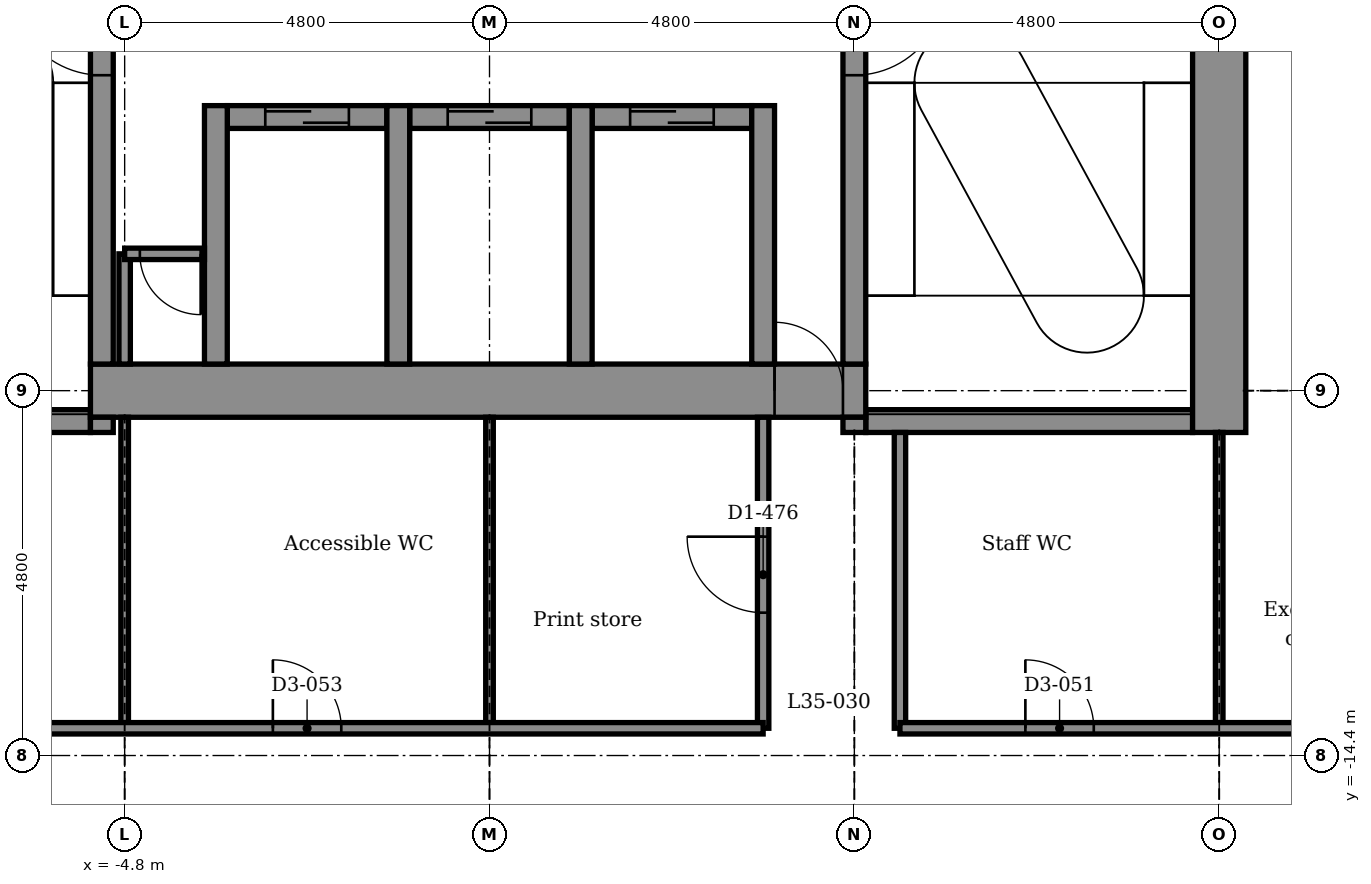
"""IFC4 building model, lengths in metres.
Left out: names, types, materials, properties, quantities, classifications, styles, units other than length and angle.
Written with IfcOpenShell. Run it as: python <this file> out.ifc"""

import sys

from ifc_helpers import new_model, si_unit, direction, frame, frame_2d, origin, place, context, subcontext, project, spatial, rectangle, extrude, element, fill, save


model = new_model("IFC4")
c1 = context("Model", 3, precision=1e-05, world=origin(), true_north=direction((0.0, 1.0)))
c2 = subcontext(c1, "Body", "Model", "MODEL_VIEW")
j1 = project(units=[si_unit("LENGTHUNIT", "METRE"), si_unit("PLANEANGLEUNIT", "RADIAN")], contexts=[c1])
p1 = place(None, origin())
s1 = spatial("IfcSite", under=j1, at=p1, CompositionType="ELEMENT")
p2 = place(p1, origin())
s2 = spatial("IfcBuilding", under=s1, at=p2, CompositionType="ELEMENT")
p3 = place(p2, frame((0.0, 0.0, 170.0)))
s3 = spatial("IfcBuildingStorey", under=s2, at=p3, CompositionType="ELEMENT", Elevation=170.0)
p4 = place(p3, frame((-9.25, -10.0, -0.15), z_axis=(0.0, 0.0, 1.0), x_axis=(1.0, 0.0, 0.0)))
e1 = element("IfcWall", 1, at=p4, inside=s3, PredefinedType="STANDARD", context=c2, shape_type="SweptSolid", body=[
    extrude(rectangle(XDim=4.0, YDim=0.3, at=frame_2d((2.0, 0.0))), origin(), (0.0, 0.0, 1.0), 3.9),
])
p5 = place(p3, frame((4.95, -10.0, -0.15), z_axis=(0.0, 0.0, 1.0), x_axis=(1.0, 0.0, 0.0)))
e2 = element("IfcWall", 2, at=p5, inside=s3, PredefinedType="STANDARD", context=c2, shape_type="SweptSolid", body=[
    extrude(rectangle(XDim=4.3, YDim=0.3, at=frame_2d((2.15, 0.0))), origin(), (0.0, 0.0, 1.0), 3.9),
])
p6 = place(p3, frame((-5.25, -9.6, -0.15), z_axis=(0.0, 0.0, 1.0), x_axis=(1.0, 0.0, 0.0)))
e3 = element("IfcWall", 3, at=p6, inside=s3, PredefinedType="SHEAR", context=c2, shape_type="SweptSolid", body=[
    extrude(rectangle(XDim=10.2, YDim=0.7, at=frame_2d((5.1, 0.0))), origin(), (0.0, 0.0, 1.0), 3.9),
])
p7 = place(p6, frame((9.0, 0.0, 0.15)))
e4 = element("IfcOpeningElement", 4, at=p7, cuts=e3, PredefinedType="OPENING", context=c2, shape_type="SweptSolid", body=[
    extrude(rectangle(XDim=0.9, YDim=2.1, at=frame_2d((0.45, 1.05))), frame((0.0, 0.36, 0.0), z_axis=(0.0, -1.0, 0.0), x_axis=(1.0, 0.0, 0.0)), (0.0, 0.0, 1.0), 0.72),
])
p8 = place(p3, frame((-3.45, -6.0, -0.15), z_axis=(0.0, 0.0, 1.0), x_axis=(1.0, 0.0, 0.0)))
e5 = element("IfcWall", 5, at=p8, inside=s3, PredefinedType="STANDARD", context=c2, shape_type="SweptSolid", body=[
    extrude(rectangle(XDim=2.1, YDim=0.3, at=frame_2d((1.05, 0.0))), origin(), (0.0, 0.0, 1.0), 3.9),
])
p9 = place(p8, frame((0.5, 0.0, 0.15)))
e6 = element("IfcOpeningElement", 6, at=p9, cuts=e5, PredefinedType="OPENING", context=c2, shape_type="SweptSolid", body=[
    extrude(rectangle(XDim=1.1, YDim=2.1, at=frame_2d((0.55, 1.05))), frame((0.0, 0.16, 0.0), z_axis=(0.0, -1.0, 0.0), x_axis=(1.0, 0.0, 0.0)), (0.0, 0.0, 1.0), 0.32),
])
p10 = place(p3, frame((-1.05, -6.0, -0.15), z_axis=(0.0, 0.0, 1.0), x_axis=(1.0, 0.0, 0.0)))
e7 = element("IfcWall", 7, at=p10, inside=s3, PredefinedType="STANDARD", context=c2, shape_type="SweptSolid", body=[
    extrude(rectangle(XDim=2.1, YDim=0.3, at=frame_2d((1.05, 0.0))), origin(), (0.0, 0.0, 1.0), 3.9),
])
p11 = place(p10, frame((0.5, 0.0, 0.15)))
e8 = element("IfcOpeningElement", 8, at=p11, cuts=e7, PredefinedType="OPENING", context=c2, shape_type="SweptSolid", body=[
    extrude(rectangle(XDim=1.1, YDim=2.1, at=frame_2d((0.55, 1.05))), frame((0.0, 0.16, 0.0), z_axis=(0.0, -1.0, 0.0), x_axis=(1.0, 0.0, 0.0)), (0.0, 0.0, 1.0), 0.32),
])
p12 = place(p3, frame((1.35, -6.0, -0.15), z_axis=(0.0, 0.0, 1.0), x_axis=(1.0, 0.0, 0.0)))
e9 = element("IfcWall", 9, at=p12, inside=s3, PredefinedType="STANDARD", context=c2, shape_type="SweptSolid", body=[
    extrude(rectangle(XDim=2.1, YDim=0.3, at=frame_2d((1.05, 0.0))), origin(), (0.0, 0.0, 1.0), 3.9),
])
p13 = place(p12, frame((0.5, 0.0, 0.15)))
e10 = element("IfcOpeningElement", 10, at=p13, cuts=e9, PredefinedType="OPENING", context=c2, shape_type="SweptSolid", body=[
    extrude(rectangle(XDim=1.1, YDim=2.1, at=frame_2d((0.55, 1.05))), frame((0.0, 0.16, 0.0), z_axis=(0.0, -1.0, 0.0), x_axis=(1.0, 0.0, 0.0)), (0.0, 0.0, 1.0), 0.32),
])
p14 = place(p3, frame((-5.1, -10.15, -0.15), z_axis=(0.0, 0.0, 1.0), x_axis=(0.0, 1.0, 0.0)))
e11 = element("IfcWall", 11, at=p14, inside=s3, PredefinedType="STANDARD", context=c2, shape_type="SweptSolid", body=[
    extrude(rectangle(XDim=0.2, YDim=0.3, at=frame_2d((0.1, 0.0))), origin(), (0.0, 0.0, 1.0), 3.9),
])
p15 = place(p3, frame((-5.1, -9.25, -0.15), z_axis=(0.0, 0.0, 1.0), x_axis=(0.0, 1.0, 0.0)))
e12 = element("IfcWall", 12, at=p15, inside=s3, PredefinedType="STANDARD", context=c2, shape_type="SweptSolid", body=[
    extrude(rectangle(XDim=7.0, YDim=0.3, at=frame_2d((3.5, 0.0))), origin(), (0.0, 0.0, 1.0), 3.9),
])
p16 = place(p15, frame((3.8, 0.0, 0.15)))
e13 = element("IfcOpeningElement", 13, at=p16, cuts=e12, PredefinedType="OPENING", context=c2, shape_type="SweptSolid", body=[
    extrude(rectangle(XDim=1.2, YDim=2.1, at=frame_2d((0.6, 1.05))), frame((0.0, 0.16, 0.0), z_axis=(0.0, -1.0, 0.0), x_axis=(1.0, 0.0, 0.0)), (0.0, 0.0, 1.0), 0.32),
])
for number, where, z_axis, x_axis in (
    (14, (-3.6, -9.25, -0.15), (0.0, 0.0, 1.0), (0.0, 1.0, 0.0)),
    (15, (-1.2, -9.25, -0.15), (0.0, 0.0, 1.0), (0.0, 1.0, 0.0)),
    (16, (1.2, -9.25, -0.15), (0.0, 0.0, 1.0), (0.0, 1.0, 0.0)),
    (17, (3.6, -9.25, -0.15), (0.0, 0.0, 1.0), (0.0, 1.0, 0.0)),
):
    element("IfcWall", number, at=place(p3, frame(where, z_axis=z_axis, x_axis=x_axis)), inside=s3, PredefinedType="STANDARD", context=c2, shape_type="SweptSolid", body=[
        extrude(rectangle(XDim=3.4, YDim=0.3, at=frame_2d((1.7, 0.0))), origin(), (0.0, 0.0, 1.0), 3.9),
    ])
p17 = place(p3, frame((4.8, -10.15, -0.15), z_axis=(0.0, 0.0, 1.0), x_axis=(0.0, 1.0, 0.0)))
e18 = element("IfcWall", 18, at=p17, inside=s3, PredefinedType="STANDARD", context=c2, shape_type="SweptSolid", body=[
    extrude(rectangle(XDim=0.2, YDim=0.3, at=frame_2d((0.1, 0.0))), origin(), (0.0, 0.0, 1.0), 3.9),
])
p18 = place(p3, frame((4.8, -9.25, -0.15), z_axis=(0.0, 0.0, 1.0), x_axis=(0.0, 1.0, 0.0)))
e19 = element("IfcWall", 19, at=p18, inside=s3, PredefinedType="STANDARD", context=c2, shape_type="SweptSolid", body=[
    extrude(rectangle(XDim=7.0, YDim=0.3, at=frame_2d((3.5, 0.0))), origin(), (0.0, 0.0, 1.0), 3.9),
])
p19 = place(p18, frame((3.8, 0.0, 0.15)))
e20 = element("IfcOpeningElement", 20, at=p19, cuts=e19, PredefinedType="OPENING", context=c2, shape_type="SweptSolid", body=[
    extrude(rectangle(XDim=1.2, YDim=2.1, at=frame_2d((0.6, 1.05))), frame((0.0, 0.16, 0.0), z_axis=(0.0, -1.0, 0.0), x_axis=(1.0, 0.0, 0.0)), (0.0, 0.0, 1.0), 0.32),
])
p20 = place(p3, frame((9.6, -10.15, -0.15), z_axis=(0.0, 0.0, 1.0), x_axis=(0.0, 1.0, 0.0)))
e21 = element("IfcWall", 21, at=p20, inside=s3, PredefinedType="SHEAR", context=c2, shape_type="SweptSolid", body=[
    extrude(rectangle(XDim=20.1, YDim=0.7, at=frame_2d((10.05, 0.0))), origin(), (0.0, 0.0, 1.0), 3.9),
])
p21 = place(p3, frame((9.6, -14.042, 0.0), z_axis=(0.0, 0.0, 1.0), x_axis=(0.0, 1.0, 0.0)))
e22 = element("IfcWall", 22, at=p21, inside=s3, PredefinedType="PARTITIONING", context=c2, shape_type="SweptSolid", body=[
    extrude(rectangle(XDim=3.892, YDim=0.1, at=frame_2d((1.946, 0.0))), origin(), (0.0, 0.0, 1.0), 3.066),
])
p22 = place(p3, frame((5.4, -14.042, 0.0), z_axis=(0.0, 0.0, 1.0), x_axis=(0.0, 1.0, 0.0)))
e23 = element("IfcWall", 23, at=p22, inside=s3, PredefinedType="PARTITIONING", context=c2, shape_type="SweptSolid", body=[
    extrude(rectangle(XDim=3.892, YDim=0.15, at=frame_2d((1.946, 0.0))), origin(), (0.0, 0.0, 1.0), 3.75),
])
p23 = place(p3, frame((3.6, -14.042, 0.0), z_axis=(0.0, 0.0, 1.0), x_axis=(0.0, 1.0, 0.0)))
e24 = element("IfcWall", 24, at=p23, inside=s3, PredefinedType="PARTITIONING", context=c2, shape_type="SweptSolid", body=[
    extrude(rectangle(XDim=4.092, YDim=0.15, at=frame_2d((2.046, 0.0))), origin(), (0.0, 0.0, 1.0), 3.75),
])
p24 = place(p23, frame((1.521, 0.0, 0.0)))
e25 = element("IfcOpeningElement", 25, at=p24, cuts=e24, PredefinedType="OPENING", context=c2, shape_type="SweptSolid", body=[
    extrude(rectangle(XDim=1.0, YDim=2.1, at=frame_2d((0.5, 1.05))), frame((0.0, 0.085, 0.0), z_axis=(0.0, -1.0, 0.0), x_axis=(1.0, 0.0, 0.0)), (0.0, 0.0, 1.0), 0.17),
])
for number, where, z_axis, x_axis in (
    (26, (0.0, -14.042, 0.0), (0.0, 0.0, 1.0), (0.0, 1.0, 0.0)),
    (27, (-4.8, -14.042, 0.0), (0.0, 0.0, 1.0), (0.0, 1.0, 0.0)),
):
    element("IfcWall", number, at=place(p3, frame(where, z_axis=z_axis, x_axis=x_axis)), inside=s3, PredefinedType="PARTITIONING", context=c2, shape_type="SweptSolid", body=[
        extrude(rectangle(XDim=4.092, YDim=0.1, at=frame_2d((2.046, 0.0))), origin(), (0.0, 0.0, 1.0), 3.066),
    ])
p25 = place(p3, frame((-4.8, -9.25, 0.0), z_axis=(0.0, 0.0, 1.0), x_axis=(0.0, 1.0, 0.0)))
e28 = element("IfcWall", 28, at=p25, inside=s3, PredefinedType="PARTITIONING", context=c2, shape_type="SweptSolid", body=[
    extrude(rectangle(XDim=1.45, YDim=0.15, at=frame_2d((0.725, 0.0))), origin(), (0.0, 0.0, 1.0), 3.75),
])
p26 = place(p3, frame((-17.021, -14.042, 0.0), z_axis=(0.0, 0.0, 1.0), x_axis=(1.0, 0.0, 0.0)))
e29 = element("IfcWall", 29, at=p26, inside=s3, PredefinedType="PARTITIONING", context=c2, shape_type="SweptSolid", body=[
    extrude(rectangle(XDim=20.621, YDim=0.15, at=frame_2d((10.311, 0.0))), origin(), (0.0, 0.0, 1.0), 3.75),
])
p27 = place(p26, frame((8.671, 0.0, 0.0)))
e30 = element("IfcOpeningElement", 30, at=p27, cuts=e29, PredefinedType="OPENING", context=c2, shape_type="SweptSolid", body=[
    extrude(rectangle(XDim=0.9, YDim=2.1, at=frame_2d((0.45, 1.05))), frame((0.0, 0.085, 0.0), z_axis=(0.0, -1.0, 0.0), x_axis=(1.0, 0.0, 0.0)), (0.0, 0.0, 1.0), 0.17),
])
p28 = place(p26, frame((14.171, 0.0, 0.0)))
e31 = element("IfcOpeningElement", 31, at=p28, cuts=e29, PredefinedType="OPENING", context=c2, shape_type="SweptSolid", body=[
    extrude(rectangle(XDim=0.9, YDim=2.1, at=frame_2d((0.45, 1.05))), frame((0.0, 0.085, 0.0), z_axis=(0.0, -1.0, 0.0), x_axis=(1.0, 0.0, 0.0)), (0.0, 0.0, 1.0), 0.17),
])
p29 = place(p3, frame((5.4, -14.042, 0.0), z_axis=(0.0, 0.0, 1.0), x_axis=(1.0, 0.0, 0.0)))
e32 = element("IfcWall", 32, at=p29, inside=s3, PredefinedType="PARTITIONING", context=c2, shape_type="SweptSolid", body=[
    extrude(rectangle(XDim=13.423, YDim=0.15, at=frame_2d((6.711, 0.0))), origin(), (0.0, 0.0, 1.0), 3.75),
])
p30 = place(p29, frame((1.65, 0.0, 0.0)))
e33 = element("IfcOpeningElement", 33, at=p30, cuts=e32, PredefinedType="OPENING", context=c2, shape_type="SweptSolid", body=[
    extrude(rectangle(XDim=0.9, YDim=2.1, at=frame_2d((0.45, 1.05))), frame((0.0, 0.085, 0.0), z_axis=(0.0, -1.0, 0.0), x_axis=(1.0, 0.0, 0.0)), (0.0, 0.0, 1.0), 0.17),
])
p31 = place(p3, frame((-4.8, -7.8, 0.0), z_axis=(0.0, 0.0, 1.0), x_axis=(1.0, 0.0, 0.0)))
e34 = element("IfcWall", 34, at=p31, inside=s3, PredefinedType="PARTITIONING", context=c2, shape_type="SweptSolid", body=[
    extrude(rectangle(XDim=1.05, YDim=0.15, at=frame_2d((0.525, 0.0))), origin(), (0.0, 0.0, 1.0), 3.75),
])
p32 = place(p31, frame((0.2, 0.0, 0.0)))
e35 = element("IfcOpeningElement", 35, at=p32, cuts=e34, PredefinedType="OPENING", context=c2, shape_type="SweptSolid", body=[
    extrude(rectangle(XDim=0.8, YDim=2.1, at=frame_2d((0.4, 1.05))), frame((0.0, 0.085, 0.0), z_axis=(0.0, -1.0, 0.0), x_axis=(1.0, 0.0, 0.0)), (0.0, 0.0, 1.0), 0.17),
])
p33 = place(p32, frame((0.8, 0.0, 0.0), z_axis=(0.0, 0.0, 1.0), x_axis=(-1.0, 0.0, 0.0)))
e36 = element("IfcDoor", 36, at=p33, inside=s3, OperationType="SINGLE_SWING_RIGHT", PredefinedType="DOOR", context=c2, shape_type="SweptSolid", body=[
    extrude(rectangle(XDim=0.8, YDim=2.1, at=frame_2d((0.4, 1.05))), frame((0.0, 0.025, 0.0), z_axis=(0.0, -1.0, 0.0), x_axis=(1.0, 0.0, 0.0)), (0.0, 0.0, 1.0), 0.05),
])
fill(e35, e36)
p34 = place(p30, origin())
e37 = element("IfcDoor", 37, at=p34, inside=s3, OperationType="SINGLE_SWING_LEFT", PredefinedType="DOOR", context=c2, shape_type="SweptSolid", body=[
    extrude(rectangle(XDim=0.9, YDim=2.1, at=frame_2d((0.45, 1.05))), frame((0.0, 0.025, 0.0), z_axis=(0.0, -1.0, 0.0), x_axis=(1.0, 0.0, 0.0)), (0.0, 0.0, 1.0), 0.05),
])
fill(e33, e37)
p35 = place(p28, origin())
e38 = element("IfcDoor", 38, at=p35, inside=s3, OperationType="SINGLE_SWING_LEFT", PredefinedType="DOOR", context=c2, shape_type="SweptSolid", body=[
    extrude(rectangle(XDim=0.9, YDim=2.1, at=frame_2d((0.45, 1.05))), frame((0.0, 0.025, 0.0), z_axis=(0.0, -1.0, 0.0), x_axis=(1.0, 0.0, 0.0)), (0.0, 0.0, 1.0), 0.05),
])
fill(e31, e38)
p36 = place(p24, origin())
e39 = element("IfcDoor", 39, at=p36, inside=s3, OperationType="SINGLE_SWING_RIGHT", PredefinedType="DOOR", context=c2, shape_type="SweptSolid", body=[
    extrude(rectangle(XDim=1.0, YDim=2.1, at=frame_2d((0.5, 1.05))), frame((0.0, 0.025, 0.0), z_axis=(0.0, -1.0, 0.0), x_axis=(1.0, 0.0, 0.0)), (0.0, 0.0, 1.0), 0.05),
])
fill(e25, e39)
p37 = place(p9, origin())
e40 = element("IfcDoor", 40, at=p37, inside=s3, OperationType="DOUBLE_DOOR_SLIDING", PredefinedType="DOOR", context=c2, shape_type="SweptSolid", body=[
    extrude(rectangle(XDim=1.1, YDim=2.1, at=frame_2d((0.55, 1.05))), frame((0.0, 0.025, 0.0), z_axis=(0.0, -1.0, 0.0), x_axis=(1.0, 0.0, 0.0)), (0.0, 0.0, 1.0), 0.05),
])
fill(e6, e40)
p38 = place(p11, origin())
e41 = element("IfcDoor", 41, at=p38, inside=s3, OperationType="DOUBLE_DOOR_SLIDING", PredefinedType="DOOR", context=c2, shape_type="SweptSolid", body=[
    extrude(rectangle(XDim=1.1, YDim=2.1, at=frame_2d((0.55, 1.05))), frame((0.0, 0.025, 0.0), z_axis=(0.0, -1.0, 0.0), x_axis=(1.0, 0.0, 0.0)), (0.0, 0.0, 1.0), 0.05),
])
fill(e8, e41)
p39 = place(p13, origin())
e42 = element("IfcDoor", 42, at=p39, inside=s3, OperationType="DOUBLE_DOOR_SLIDING", PredefinedType="DOOR", context=c2, shape_type="SweptSolid", body=[
    extrude(rectangle(XDim=1.1, YDim=2.1, at=frame_2d((0.55, 1.05))), frame((0.0, 0.025, 0.0), z_axis=(0.0, -1.0, 0.0), x_axis=(1.0, 0.0, 0.0)), (0.0, 0.0, 1.0), 0.05),
])
fill(e10, e42)
p40 = place(p16, origin())
e43 = element("IfcDoor", 43, at=p40, inside=s3, OperationType="SINGLE_SWING_RIGHT", PredefinedType="DOOR", context=c2, shape_type="SweptSolid", body=[
    extrude(rectangle(XDim=1.2, YDim=2.1, at=frame_2d((0.6, 1.05))), frame((0.0, 0.025, 0.0), z_axis=(0.0, -1.0, 0.0), x_axis=(1.0, 0.0, 0.0)), (0.0, 0.0, 1.0), 0.05),
])
fill(e13, e43)
p41 = place(p19, frame((1.2, 0.0, 0.0), z_axis=(0.0, 0.0, 1.0), x_axis=(-1.0, 0.0, 0.0)))
e44 = element("IfcDoor", 44, at=p41, inside=s3, OperationType="SINGLE_SWING_RIGHT", PredefinedType="DOOR", context=c2, shape_type="SweptSolid", body=[
    extrude(rectangle(XDim=1.2, YDim=2.1, at=frame_2d((0.6, 1.05))), frame((0.0, 0.025, 0.0), z_axis=(0.0, -1.0, 0.0), x_axis=(1.0, 0.0, 0.0)), (0.0, 0.0, 1.0), 0.05),
])
fill(e20, e44)
p42 = place(p7, origin())
e45 = element("IfcDoor", 45, at=p42, inside=s3, OperationType="SINGLE_SWING_LEFT", PredefinedType="DOOR", context=c2, shape_type="SweptSolid", body=[
    extrude(rectangle(XDim=0.9, YDim=2.1, at=frame_2d((0.45, 1.05))), frame((0.0, 0.025, 0.0), z_axis=(0.0, -1.0, 0.0), x_axis=(1.0, 0.0, 0.0)), (0.0, 0.0, 1.0), 0.05),
])
fill(e4, e45)
save(model, sys.argv[1])
